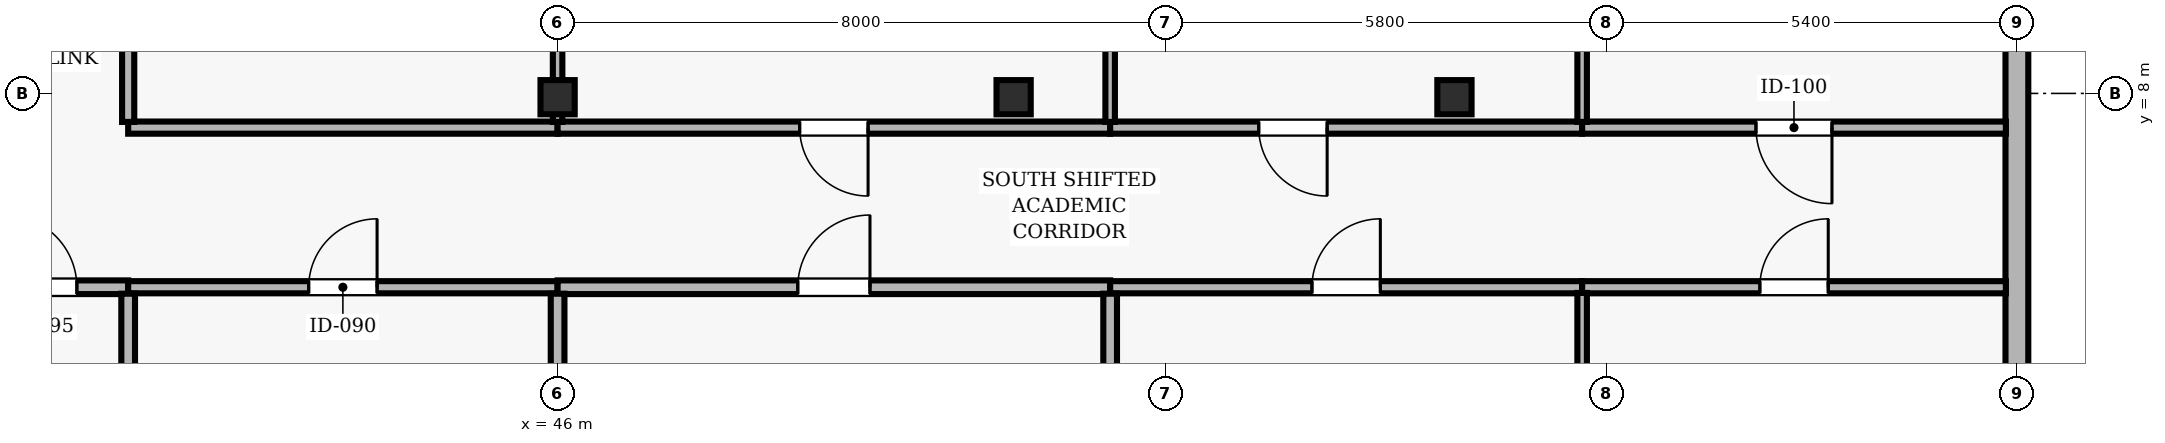
"""IFC4 building model, lengths in metres.
Left out: names, types, materials, properties, quantities, classifications, styles, units other than length and angle.
Written with IfcOpenShell. Run it as: python <this file> out.ifc"""

import sys

from ifc_helpers import new_model, si_unit, direction, frame, frame_2d, origin, origin_2d, place, context, subcontext, project, spatial, rectangle, hollow_rectangle, extrude, element, fill, save


model = new_model("IFC4")
c1 = context("Model", 3, precision=1e-05, world=origin(), true_north=direction((0.0, 1.0)))
c2 = subcontext(c1, "Body", "Model", "MODEL_VIEW")
j1 = project(units=[si_unit("LENGTHUNIT", "METRE"), si_unit("PLANEANGLEUNIT", "RADIAN")], contexts=[c1])
p1 = place(None, origin())
s1 = spatial("IfcSite", under=j1, at=p1, CompositionType="ELEMENT")
p2 = place(p1, origin())
s2 = spatial("IfcBuilding", under=s1, at=p2, CompositionType="ELEMENT")
p3 = place(p2, frame((0.0, 0.0, 195.3)))
s3 = spatial("IfcBuildingStorey", under=s2, at=p3, CompositionType="ELEMENT", Elevation=195.3)
for number, where, z_axis, x_axis in (
    (1, (46.0, 7.95, 0.0), (0.0, 0.0, 1.0), (1.0, 0.0, 0.0)),
    (2, (52.0, 7.95, 0.0), (0.0, 0.0, 1.0), (1.0, 0.0, 0.0)),
    (3, (57.8, 7.95, 0.0), (0.0, 0.0, 1.0), (1.0, 0.0, 0.0)),
):
    element("IfcColumn", number, at=place(p3, frame(where, z_axis=z_axis, x_axis=x_axis)), inside=s3, PredefinedType="COLUMN", context=c2, shape_type="SweptSolid", body=[
        extrude(hollow_rectangle(XDim=0.45, YDim=0.45, WallThickness=0.02, at=origin_2d()), origin(), (0.0, 0.0, 1.0), 3.9),
    ])
p4 = place(p3, frame((65.2, 2.5, 0.0), z_axis=(0.0, 0.0, 1.0), x_axis=(0.0, 1.0, 0.0)))
e4 = element("IfcWall", 4, at=p4, inside=s3, PredefinedType="SOLIDWALL", context=c2, shape_type="SweptSolid", body=[
    extrude(rectangle(XDim=11.0, YDim=0.3, at=frame_2d((5.5, 0.0))), origin(), (0.0, 0.0, 1.0), 3.69),
])
p5 = place(p4, frame((7.5, 0.0, 0.9)))
e5 = element("IfcOpeningElement", 5, at=p5, cuts=e4, PredefinedType="OPENING", context=c2, shape_type="SweptSolid", body=[
    extrude(rectangle(XDim=1.5, YDim=1.6, at=frame_2d((0.75, 0.8))), frame((0.0, 0.16, 0.0), z_axis=(0.0, -1.0, 0.0), x_axis=(1.0, 0.0, 0.0)), (0.0, 0.0, 1.0), 0.32),
])
p6 = place(p3, frame((38.05, 5.45, 0.0), z_axis=(0.0, 0.0, 1.0), x_axis=(1.0, 0.0, 0.0)))
e6 = element("IfcWall", 6, at=p6, inside=s3, PredefinedType="PARTITIONING", context=c2, shape_type="SweptSolid", body=[
    extrude(rectangle(XDim=2.3, YDim=0.18, at=frame_2d((1.15, 0.0))), origin(), (0.0, 0.0, 1.0), 3.372),
])
p7 = place(p6, frame((0.675, 0.0, 0.0)))
e7 = element("IfcOpeningElement", 7, at=p7, cuts=e6, PredefinedType="OPENING", context=c2, shape_type="SweptSolid", body=[
    extrude(rectangle(XDim=0.95, YDim=2.1, at=frame_2d((0.475, 1.05))), frame((0.0, 0.1, 0.0), z_axis=(0.0, -1.0, 0.0), x_axis=(1.0, 0.0, 0.0)), (0.0, 0.0, 1.0), 0.2),
])
p8 = place(p3, frame((40.35, 5.45, 0.0), z_axis=(0.0, 0.0, 1.0), x_axis=(1.0, 0.0, 0.0)))
e8 = element("IfcWall", 8, at=p8, inside=s3, PredefinedType="PARTITIONING", context=c2, shape_type="SweptSolid", body=[
    extrude(rectangle(XDim=5.65, YDim=0.16, at=frame_2d((2.825, 0.0))), origin(), (0.0, 0.0, 1.0), 3.372),
])
p9 = place(p8, frame((2.375, 0.0, 0.0)))
e9 = element("IfcOpeningElement", 9, at=p9, cuts=e8, PredefinedType="OPENING", context=c2, shape_type="SweptSolid", body=[
    extrude(rectangle(XDim=0.9, YDim=2.1, at=frame_2d((0.45, 1.05))), frame((0.0, 0.09, 0.0), z_axis=(0.0, -1.0, 0.0), x_axis=(1.0, 0.0, 0.0)), (0.0, 0.0, 1.0), 0.18),
])
p10 = place(p3, frame((46.0, 5.45, 0.0), z_axis=(0.0, 0.0, 1.0), x_axis=(1.0, 0.0, 0.0)))
e10 = element("IfcWall", 10, at=p10, inside=s3, PredefinedType="PARTITIONING", context=c2, shape_type="SweptSolid", body=[
    extrude(rectangle(XDim=7.27, YDim=0.18, at=frame_2d((3.635, 0.0))), origin(), (0.0, 0.0, 1.0), 3.372),
])
p11 = place(p10, frame((3.16, 0.0, 0.0)))
e11 = element("IfcOpeningElement", 11, at=p11, cuts=e10, PredefinedType="OPENING", context=c2, shape_type="SweptSolid", body=[
    extrude(rectangle(XDim=0.95, YDim=2.1, at=frame_2d((0.475, 1.05))), frame((0.0, 0.1, 0.0), z_axis=(0.0, -1.0, 0.0), x_axis=(1.0, 0.0, 0.0)), (0.0, 0.0, 1.0), 0.2),
])
p12 = place(p3, frame((46.0, 7.55, 0.0), z_axis=(0.0, 0.0, 1.0), x_axis=(-1.0, 0.0, 0.0)))
e12 = element("IfcWall", 12, at=p12, inside=s3, PredefinedType="PARTITIONING", context=c2, shape_type="SweptSolid", body=[
    extrude(rectangle(XDim=5.65, YDim=0.16, at=frame_2d((2.825, 0.0))), origin(), (0.0, 0.0, 1.0), 3.146),
])
p13 = place(p3, frame((53.27, 5.45, 0.0), z_axis=(0.0, 0.0, 1.0), x_axis=(1.0, 0.0, 0.0)))
e13 = element("IfcWall", 13, at=p13, inside=s3, PredefinedType="PARTITIONING", context=c2, shape_type="SweptSolid", body=[
    extrude(rectangle(XDim=6.21, YDim=0.16, at=frame_2d((3.105, 0.0))), origin(), (0.0, 0.0, 1.0), 3.372),
])
p14 = place(p13, frame((2.655, 0.0, 0.0)))
e14 = element("IfcOpeningElement", 14, at=p14, cuts=e13, PredefinedType="OPENING", context=c2, shape_type="SweptSolid", body=[
    extrude(rectangle(XDim=0.9, YDim=2.1, at=frame_2d((0.45, 1.05))), frame((0.0, 0.09, 0.0), z_axis=(0.0, -1.0, 0.0), x_axis=(1.0, 0.0, 0.0)), (0.0, 0.0, 1.0), 0.18),
])
p15 = place(p3, frame((53.27, 7.55, 0.0), z_axis=(0.0, 0.0, 1.0), x_axis=(-1.0, 0.0, 0.0)))
e15 = element("IfcWall", 15, at=p15, inside=s3, PredefinedType="PARTITIONING", context=c2, shape_type="SweptSolid", body=[
    extrude(rectangle(XDim=7.27, YDim=0.16, at=frame_2d((3.635, 0.0))), origin(), (0.0, 0.0, 1.0), 3.146),
])
p16 = place(p15, frame((3.185, 0.0, 0.0)))
e16 = element("IfcOpeningElement", 16, at=p16, cuts=e15, PredefinedType="OPENING", context=c2, shape_type="SweptSolid", body=[
    extrude(rectangle(XDim=0.9, YDim=2.1, at=frame_2d((0.45, 1.05))), frame((0.0, 0.09, 0.0), z_axis=(0.0, -1.0, 0.0), x_axis=(1.0, 0.0, 0.0)), (0.0, 0.0, 1.0), 0.18),
])
p17 = place(p3, frame((59.48, 5.45, 0.0), z_axis=(0.0, 0.0, 1.0), x_axis=(1.0, 0.0, 0.0)))
e17 = element("IfcWall", 17, at=p17, inside=s3, PredefinedType="PARTITIONING", context=c2, shape_type="SweptSolid", body=[
    extrude(rectangle(XDim=5.575, YDim=0.16, at=frame_2d((2.788, 0.0))), origin(), (0.0, 0.0, 1.0), 3.69),
])
p18 = place(p17, frame((2.338, 0.0, 0.0)))
e18 = element("IfcOpeningElement", 18, at=p18, cuts=e17, PredefinedType="OPENING", context=c2, shape_type="SweptSolid", body=[
    extrude(rectangle(XDim=0.9, YDim=2.1, at=frame_2d((0.45, 1.05))), frame((0.0, 0.09, 0.0), z_axis=(0.0, -1.0, 0.0), x_axis=(1.0, 0.0, 0.0)), (0.0, 0.0, 1.0), 0.18),
])
p19 = place(p3, frame((59.48, 7.55, 0.0), z_axis=(0.0, 0.0, 1.0), x_axis=(-1.0, 0.0, 0.0)))
e19 = element("IfcWall", 19, at=p19, inside=s3, PredefinedType="PARTITIONING", context=c2, shape_type="SweptSolid", body=[
    extrude(rectangle(XDim=6.21, YDim=0.16, at=frame_2d((3.105, 0.0))), origin(), (0.0, 0.0, 1.0), 3.146),
])
p20 = place(p19, frame((3.355, 0.0, 0.0)))
e20 = element("IfcOpeningElement", 20, at=p20, cuts=e19, PredefinedType="OPENING", context=c2, shape_type="SweptSolid", body=[
    extrude(rectangle(XDim=0.9, YDim=2.1, at=frame_2d((0.45, 1.05))), frame((0.0, 0.09, 0.0), z_axis=(0.0, -1.0, 0.0), x_axis=(1.0, 0.0, 0.0)), (0.0, 0.0, 1.0), 0.18),
])
p21 = place(p3, frame((65.055, 7.55, 0.0), z_axis=(0.0, 0.0, 1.0), x_axis=(-1.0, 0.0, 0.0)))
e21 = element("IfcWall", 21, at=p21, inside=s3, PredefinedType="PARTITIONING", context=c2, shape_type="SweptSolid", body=[
    extrude(rectangle(XDim=5.575, YDim=0.16, at=frame_2d((2.788, 0.0))), origin(), (0.0, 0.0, 1.0), 3.69),
])
p22 = place(p21, frame((2.288, 0.0, 0.0)))
e22 = element("IfcOpeningElement", 22, at=p22, cuts=e21, PredefinedType="OPENING", context=c2, shape_type="SweptSolid", body=[
    extrude(rectangle(XDim=1.0, YDim=2.1, at=frame_2d((0.5, 1.05))), frame((0.0, 0.09, 0.0), z_axis=(0.0, -1.0, 0.0), x_axis=(1.0, 0.0, 0.0)), (0.0, 0.0, 1.0), 0.18),
])
p23 = place(p3, frame((40.35, 0.145, 0.0), z_axis=(0.0, 0.0, 1.0), x_axis=(0.0, 1.0, 0.0)))
e23 = element("IfcWall", 23, at=p23, inside=s3, PredefinedType="PARTITIONING", context=c2, shape_type="SweptSolid", body=[
    extrude(rectangle(XDim=5.22, YDim=0.18, at=frame_2d((2.61, 0.0))), origin(), (0.0, 0.0, 1.0), 3.69),
])
p24 = place(p3, frame((40.35, 7.625, 0.0), z_axis=(0.0, 0.0, 1.0), x_axis=(0.0, 1.0, 0.0)))
e24 = element("IfcWall", 24, at=p24, inside=s3, PredefinedType="PARTITIONING", context=c2, shape_type="SweptSolid", body=[
    extrude(rectangle(XDim=8.3, YDim=0.16, at=frame_2d((4.15, 0.0))), origin(), (0.0, 0.0, 1.0), 3.372),
])
p25 = place(p24, frame((3.7, 0.0, 0.0)))
e25 = element("IfcOpeningElement", 25, at=p25, cuts=e24, PredefinedType="OPENING", context=c2, shape_type="SweptSolid", body=[
    extrude(rectangle(XDim=0.9, YDim=2.1, at=frame_2d((0.45, 1.05))), frame((0.0, 0.09, 0.0), z_axis=(0.0, -1.0, 0.0), x_axis=(1.0, 0.0, 0.0)), (0.0, 0.0, 1.0), 0.18),
])
p26 = place(p3, frame((46.0, 0.145, 0.0), z_axis=(0.0, 0.0, 1.0), x_axis=(0.0, 1.0, 0.0)))
e26 = element("IfcWall", 26, at=p26, inside=s3, PredefinedType="PARTITIONING", context=c2, shape_type="SweptSolid", body=[
    extrude(rectangle(XDim=5.22, YDim=0.18, at=frame_2d((2.61, 0.0))), origin(), (0.0, 0.0, 1.0), 3.146),
])
p27 = place(p3, frame((46.0, 7.625, 0.0), z_axis=(0.0, 0.0, 1.0), x_axis=(0.0, 1.0, 0.0)))
e27 = element("IfcWall", 27, at=p27, inside=s3, PredefinedType="PARTITIONING", context=c2, shape_type="SweptSolid", body=[
    extrude(rectangle(XDim=8.318, YDim=0.125, at=frame_2d((4.159, 0.0))), origin(), (0.0, 0.0, 1.0), 3.146),
])
p28 = place(p3, frame((53.27, 0.145, 0.0), z_axis=(0.0, 0.0, 1.0), x_axis=(0.0, 1.0, 0.0)))
e28 = element("IfcWall", 28, at=p28, inside=s3, PredefinedType="PARTITIONING", context=c2, shape_type="SweptSolid", body=[
    extrude(rectangle(XDim=5.22, YDim=0.18, at=frame_2d((2.61, 0.0))), origin(), (0.0, 0.0, 1.0), 3.69),
])
p29 = place(p3, frame((53.27, 7.625, 0.0), z_axis=(0.0, 0.0, 1.0), x_axis=(0.0, 1.0, 0.0)))
e29 = element("IfcWall", 29, at=p29, inside=s3, PredefinedType="PARTITIONING", context=c2, shape_type="SweptSolid", body=[
    extrude(rectangle(XDim=8.23, YDim=0.125, at=frame_2d((4.115, 0.0))), origin(), (0.0, 0.0, 1.0), 3.69),
])
p30 = place(p3, frame((59.48, 0.145, 0.0), z_axis=(0.0, 0.0, 1.0), x_axis=(0.0, 1.0, 0.0)))
e30 = element("IfcWall", 30, at=p30, inside=s3, PredefinedType="PARTITIONING", context=c2, shape_type="SweptSolid", body=[
    extrude(rectangle(XDim=5.23, YDim=0.125, at=frame_2d((2.615, 0.0))), origin(), (0.0, 0.0, 1.0), 3.69),
])
p31 = place(p3, frame((59.48, 7.625, 0.0), z_axis=(0.0, 0.0, 1.0), x_axis=(0.0, 1.0, 0.0)))
e31 = element("IfcWall", 31, at=p31, inside=s3, PredefinedType="PARTITIONING", context=c2, shape_type="SweptSolid", body=[
    extrude(rectangle(XDim=8.23, YDim=0.125, at=frame_2d((4.115, 0.0))), origin(), (0.0, 0.0, 1.0), 3.69),
])
p32 = place(p7, origin())
e32 = element("IfcDoor", 32, at=p32, inside=s3, OperationType="SINGLE_SWING_LEFT", PredefinedType="DOOR", context=c2, shape_type="SweptSolid", body=[
    extrude(rectangle(XDim=0.95, YDim=2.1, at=frame_2d((0.475, 1.05))), frame((0.0, 0.025, 0.0), z_axis=(0.0, -1.0, 0.0), x_axis=(1.0, 0.0, 0.0)), (0.0, 0.0, 1.0), 0.05),
])
fill(e7, e32)
p33 = place(p9, origin())
e33 = element("IfcDoor", 33, at=p33, inside=s3, OperationType="SINGLE_SWING_RIGHT", PredefinedType="DOOR", context=c2, shape_type="SweptSolid", body=[
    extrude(rectangle(XDim=0.9, YDim=2.1, at=frame_2d((0.45, 1.05))), frame((0.0, 0.025, 0.0), z_axis=(0.0, -1.0, 0.0), x_axis=(1.0, 0.0, 0.0)), (0.0, 0.0, 1.0), 0.05),
])
fill(e9, e33)
p34 = place(p11, origin())
e34 = element("IfcDoor", 34, at=p34, inside=s3, OperationType="SINGLE_SWING_RIGHT", PredefinedType="DOOR", context=c2, shape_type="SweptSolid", body=[
    extrude(rectangle(XDim=0.95, YDim=2.1, at=frame_2d((0.475, 1.05))), frame((0.0, 0.025, 0.0), z_axis=(0.0, -1.0, 0.0), x_axis=(1.0, 0.0, 0.0)), (0.0, 0.0, 1.0), 0.05),
])
fill(e11, e34)
p35 = place(p16, origin())
e35 = element("IfcDoor", 35, at=p35, inside=s3, OperationType="SINGLE_SWING_LEFT", PredefinedType="DOOR", context=c2, shape_type="SweptSolid", body=[
    extrude(rectangle(XDim=0.9, YDim=2.1, at=frame_2d((0.45, 1.05))), frame((0.0, 0.025, 0.0), z_axis=(0.0, -1.0, 0.0), x_axis=(1.0, 0.0, 0.0)), (0.0, 0.0, 1.0), 0.05),
])
fill(e16, e35)
p36 = place(p14, origin())
e36 = element("IfcDoor", 36, at=p36, inside=s3, OperationType="SINGLE_SWING_RIGHT", PredefinedType="DOOR", context=c2, shape_type="SweptSolid", body=[
    extrude(rectangle(XDim=0.9, YDim=2.1, at=frame_2d((0.45, 1.05))), frame((0.0, 0.025, 0.0), z_axis=(0.0, -1.0, 0.0), x_axis=(1.0, 0.0, 0.0)), (0.0, 0.0, 1.0), 0.05),
])
fill(e14, e36)
p37 = place(p20, origin())
e37 = element("IfcDoor", 37, at=p37, inside=s3, OperationType="SINGLE_SWING_LEFT", PredefinedType="DOOR", context=c2, shape_type="SweptSolid", body=[
    extrude(rectangle(XDim=0.9, YDim=2.1, at=frame_2d((0.45, 1.05))), frame((0.0, 0.025, 0.0), z_axis=(0.0, -1.0, 0.0), x_axis=(1.0, 0.0, 0.0)), (0.0, 0.0, 1.0), 0.05),
])
fill(e20, e37)
p38 = place(p18, origin())
e38 = element("IfcDoor", 38, at=p38, inside=s3, OperationType="SINGLE_SWING_RIGHT", PredefinedType="DOOR", context=c2, shape_type="SweptSolid", body=[
    extrude(rectangle(XDim=0.9, YDim=2.1, at=frame_2d((0.45, 1.05))), frame((0.0, 0.025, 0.0), z_axis=(0.0, -1.0, 0.0), x_axis=(1.0, 0.0, 0.0)), (0.0, 0.0, 1.0), 0.05),
])
fill(e18, e38)
p39 = place(p22, origin())
e39 = element("IfcDoor", 39, at=p39, inside=s3, OperationType="SINGLE_SWING_LEFT", PredefinedType="DOOR", context=c2, shape_type="SweptSolid", body=[
    extrude(rectangle(XDim=1.0, YDim=2.1, at=frame_2d((0.5, 1.05))), frame((0.0, 0.025, 0.0), z_axis=(0.0, -1.0, 0.0), x_axis=(1.0, 0.0, 0.0)), (0.0, 0.0, 1.0), 0.05),
])
fill(e22, e39)
save(model, sys.argv[1])
